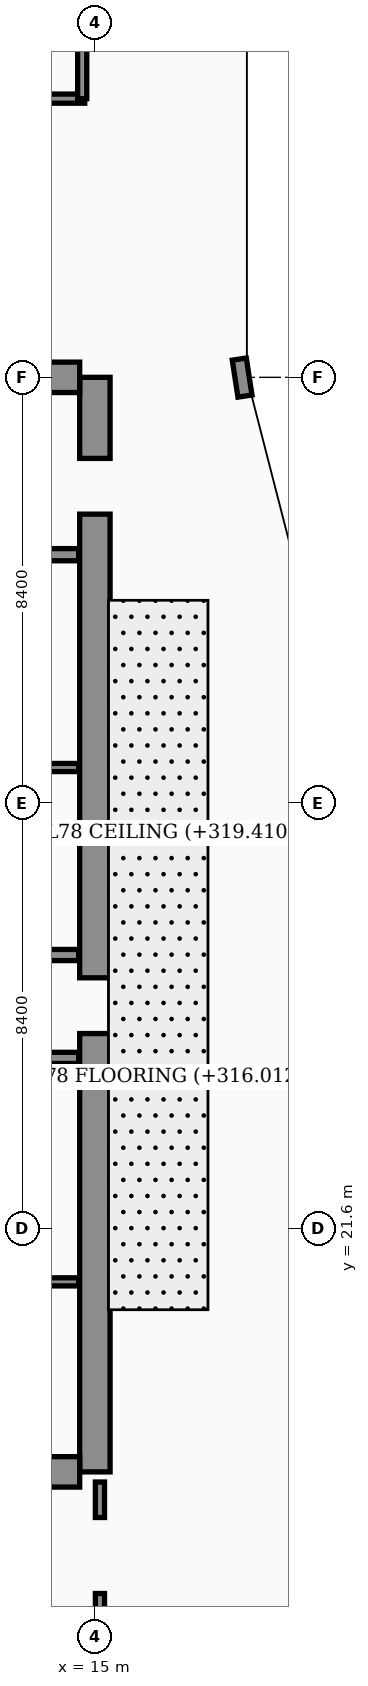
"""IFC4 building model, lengths in metres.
Left out: names, types, materials, properties, quantities, classifications, styles, units other than length and angle.
Written with IfcOpenShell. Run it as: python <this file> out.ifc"""

import sys

from ifc_helpers import new_model, si_unit, direction, frame, frame_2d, origin, place, context, subcontext, project, spatial, rectangle, extrude, element, fill, save


model = new_model("IFC4")
c1 = context("Model", 3, precision=1e-05, world=origin(), true_north=direction((0.0, 1.0)))
c2 = subcontext(c1, "Body", "Model", "MODEL_VIEW")
j1 = project(units=[si_unit("LENGTHUNIT", "METRE"), si_unit("PLANEANGLEUNIT", "RADIAN")], contexts=[c1])
p1 = place(None, origin())
s1 = spatial("IfcSite", under=j1, at=p1, CompositionType="ELEMENT")
p2 = place(p1, origin())
s2 = spatial("IfcBuilding", under=s1, at=p2, CompositionType="ELEMENT")
p3 = place(p2, frame((0.0, 0.0, 316.0)))
s3 = spatial("IfcBuildingStorey", under=s2, at=p3, CompositionType="ELEMENT", Elevation=316.0)
p4 = place(p3, frame((15.0, 16.8, 0.0), z_axis=(0.0, 0.0, 1.0), x_axis=(0.0, 1.0, 0.0)))
e1 = element("IfcWall", 1, at=p4, inside=s3, PredefinedType="SHEAR", context=c2, shape_type="SweptSolid", body=[
    extrude(rectangle(XDim=21.6, YDim=0.6, at=frame_2d((10.8, 0.0))), origin(), (0.0, 0.0, 1.0), 4.26),
])
p5 = place(p4, frame((8.65, 0.0, 0.0)))
e2 = element("IfcOpeningElement", 2, at=p5, cuts=e1, PredefinedType="OPENING", context=c2, shape_type="SweptSolid", body=[
    extrude(rectangle(XDim=1.1, YDim=2.2, at=frame_2d((0.55, 1.1))), frame((0.0, 0.31, 0.0), z_axis=(0.0, -1.0, 0.0), x_axis=(1.0, 0.0, 0.0)), (0.0, 0.0, 1.0), 0.62),
])
p6 = place(p4, frame((18.9, 0.0, 0.0)))
e3 = element("IfcOpeningElement", 3, at=p6, cuts=e1, PredefinedType="OPENING", context=c2, shape_type="SweptSolid", body=[
    extrude(rectangle(XDim=1.1, YDim=2.2, at=frame_2d((0.55, 1.1))), frame((0.0, 0.31, 0.0), z_axis=(0.0, -1.0, 0.0), x_axis=(1.0, 0.0, 0.0)), (0.0, 0.0, 1.0), 0.62),
])
p7 = place(p3, frame((4.5, 38.4, 0.0), z_axis=(0.0, 0.0, 1.0), x_axis=(1.0, 0.0, 0.0)))
e4 = element("IfcWall", 4, at=p7, inside=s3, PredefinedType="SHEAR", context=c2, shape_type="SweptSolid", body=[
    extrude(rectangle(XDim=10.2, YDim=0.6, at=frame_2d((5.1, 0.0))), origin(), (0.0, 0.0, 1.0), 4.26),
])
p8 = place(p7, frame((5.8, 0.0, 0.0)))
e5 = element("IfcOpeningElement", 5, at=p8, cuts=e4, PredefinedType="OPENING", context=c2, shape_type="SweptSolid", body=[
    extrude(rectangle(XDim=1.1, YDim=2.2, at=frame_2d((0.55, 1.1))), frame((0.0, 0.31, 0.0), z_axis=(0.0, -1.0, 0.0), x_axis=(1.0, 0.0, 0.0)), (0.0, 0.0, 1.0), 0.62),
])
p9 = place(p3, frame((4.5, 16.8, 0.0), z_axis=(0.0, 0.0, 1.0), x_axis=(1.0, 0.0, 0.0)))
e6 = element("IfcWall", 6, at=p9, inside=s3, PredefinedType="SHEAR", context=c2, shape_type="SweptSolid", body=[
    extrude(rectangle(XDim=10.2, YDim=0.6, at=frame_2d((5.1, 0.0))), origin(), (0.0, 0.0, 1.0), 4.26),
])
p10 = place(p3, frame((17.962, 38.03, 0.0), z_axis=(0.0, 0.0, 1.0), x_axis=(-0.15141125477, 0.988470855377, 0.0)))
e7 = element("IfcWall", 7, at=p10, inside=s3, PredefinedType="SOLIDWALL", context=c2, shape_type="SweptSolid", body=[
    extrude(rectangle(XDim=0.739, YDim=0.28, at=frame_2d((0.369, 0.0))), origin(), (0.0, 0.0, 1.0), 4.26),
])
p11 = place(p3, frame((9.68, 20.55, 0.0), z_axis=(0.0, 0.0, 1.0), x_axis=(1.0, 0.0, 0.0)))
e8 = element("IfcWall", 8, at=p11, inside=s3, PredefinedType="PARTITIONING", context=c2, shape_type="SweptSolid", body=[
    extrude(rectangle(XDim=5.0, YDim=0.16, at=frame_2d((2.5, 0.0))), origin(), (0.0, 0.0, 1.0), 4.26),
])
p12 = place(p11, frame((1.1, 0.0, 0.0)))
e9 = element("IfcOpeningElement", 9, at=p12, cuts=e8, PredefinedType="OPENING", context=c2, shape_type="SweptSolid", body=[
    extrude(rectangle(XDim=0.98, YDim=2.15, at=frame_2d((0.49, 1.075))), frame((0.0, 0.09, 0.0), z_axis=(0.0, -1.0, 0.0), x_axis=(1.0, 0.0, 0.0)), (0.0, 0.0, 1.0), 0.18),
])
p13 = place(p3, frame((9.68, 24.97, 0.0), z_axis=(0.0, 0.0, 1.0), x_axis=(1.0, 0.0, 0.0)))
e10 = element("IfcWall", 10, at=p13, inside=s3, PredefinedType="SOLIDWALL", context=c2, shape_type="SweptSolid", body=[
    extrude(rectangle(XDim=5.0, YDim=0.22, at=frame_2d((2.5, 0.0))), origin(), (0.0, 0.0, 1.0), 3.69),
])
p14 = place(p13, frame((0.9, 0.0, 0.0)))
e11 = element("IfcOpeningElement", 11, at=p14, cuts=e10, PredefinedType="OPENING", context=c2, shape_type="SweptSolid", body=[
    extrude(rectangle(XDim=0.98, YDim=2.15, at=frame_2d((0.49, 1.075))), frame((0.0, 0.12, 0.0), z_axis=(0.0, -1.0, 0.0), x_axis=(1.0, 0.0, 0.0)), (0.0, 0.0, 1.0), 0.24),
])
p15 = place(p3, frame((12.25, 27.0, 0.0), z_axis=(0.0, 0.0, 1.0), x_axis=(1.0, 0.0, 0.0)))
e12 = element("IfcWall", 12, at=p15, inside=s3, PredefinedType="SOLIDWALL", context=c2, shape_type="SweptSolid", body=[
    extrude(rectangle(XDim=2.43, YDim=0.22, at=frame_2d((1.215, 0.0))), origin(), (0.0, 0.0, 1.0), 4.26),
])
p16 = place(p3, frame((12.25, 30.7, 0.0), z_axis=(0.0, 0.0, 1.0), x_axis=(1.0, 0.0, 0.0)))
e13 = element("IfcWall", 13, at=p16, inside=s3, PredefinedType="PARTITIONING", context=c2, shape_type="SweptSolid", body=[
    extrude(rectangle(XDim=2.43, YDim=0.16, at=frame_2d((1.215, 0.0))), origin(), (0.0, 0.0, 1.0), 4.26),
])
p17 = place(p16, frame((0.55, 0.0, 0.0)))
e14 = element("IfcOpeningElement", 14, at=p17, cuts=e13, PredefinedType="OPENING", context=c2, shape_type="SweptSolid", body=[
    extrude(rectangle(XDim=0.98, YDim=2.15, at=frame_2d((0.49, 1.075))), frame((0.0, 0.09, 0.0), z_axis=(0.0, -1.0, 0.0), x_axis=(1.0, 0.0, 0.0)), (0.0, 0.0, 1.0), 0.18),
])
p18 = place(p3, frame((9.66, 34.9, 0.0), z_axis=(0.0, 0.0, 1.0), x_axis=(1.0, 0.0, 0.0)))
e15 = element("IfcWall", 15, at=p18, inside=s3, PredefinedType="SOLIDWALL", context=c2, shape_type="SweptSolid", body=[
    extrude(rectangle(XDim=5.02, YDim=0.24, at=frame_2d((2.51, 0.0))), origin(), (0.0, 0.0, 1.0), 4.26),
])
p19 = place(p3, frame((4.06, 43.9, 0.0), z_axis=(0.0, 0.0, 1.0), x_axis=(1.0, 0.0, 0.0)))
e16 = element("IfcWall", 16, at=p19, inside=s3, PredefinedType="PARTITIONING", context=c2, shape_type="SweptSolid", body=[
    extrude(rectangle(XDim=10.74, YDim=0.18, at=frame_2d((5.37, 0.0))), origin(), (0.0, 0.0, 1.0), 3.69),
])
p20 = place(p19, frame((0.55, 0.0, 0.0)))
e17 = element("IfcOpeningElement", 17, at=p20, cuts=e16, PredefinedType="OPENING", context=c2, shape_type="SweptSolid", body=[
    extrude(rectangle(XDim=1.02, YDim=2.2, at=frame_2d((0.51, 1.1))), frame((0.0, 0.1, 0.0), z_axis=(0.0, -1.0, 0.0), x_axis=(1.0, 0.0, 0.0)), (0.0, 0.0, 1.0), 0.2),
])
p21 = place(p19, frame((4.65, 0.0, 0.0)))
e18 = element("IfcOpeningElement", 18, at=p21, cuts=e16, PredefinedType="OPENING", context=c2, shape_type="SweptSolid", body=[
    extrude(rectangle(XDim=1.02, YDim=2.2, at=frame_2d((0.51, 1.1))), frame((0.0, 0.1, 0.0), z_axis=(0.0, -1.0, 0.0), x_axis=(1.0, 0.0, 0.0)), (0.0, 0.0, 1.0), 0.2),
])
p22 = place(p19, frame((8.4, 0.0, 0.0)))
e19 = element("IfcOpeningElement", 19, at=p22, cuts=e16, PredefinedType="OPENING", context=c2, shape_type="SweptSolid", body=[
    extrude(rectangle(XDim=1.02, YDim=2.2, at=frame_2d((0.51, 1.1))), frame((0.0, 0.1, 0.0), z_axis=(0.0, -1.0, 0.0), x_axis=(1.0, 0.0, 0.0)), (0.0, 0.0, 1.0), 0.2),
])
p23 = place(p3, frame((14.75, 43.9, 0.0), z_axis=(0.0, 0.0, 1.0), x_axis=(0.0, 1.0, 0.0)))
e20 = element("IfcWall", 20, at=p23, inside=s3, PredefinedType="PARTITIONING", context=c2, shape_type="SweptSolid", body=[
    extrude(rectangle(XDim=3.82, YDim=0.18, at=frame_2d((1.91, 0.0))), origin(), (0.0, 0.0, 1.0), 3.79),
])
p24 = place(p3, frame((15.1, 2.6, 0.0), z_axis=(0.0, 0.0, 1.0), x_axis=(0.0, 1.0, 0.0)))
e21 = element("IfcWall", 21, at=p24, inside=s3, PredefinedType="PARTITIONING", context=c2, shape_type="SweptSolid", body=[
    extrude(rectangle(XDim=14.0, YDim=0.18, at=frame_2d((7.0, 0.0))), origin(), (0.0, 0.0, 1.0), 2.54),
])
p25 = place(p24, frame((11.8, 0.0, 0.0)))
e22 = element("IfcOpeningElement", 22, at=p25, cuts=e21, PredefinedType="OPENING", context=c2, shape_type="SweptSolid", body=[
    extrude(rectangle(XDim=1.5, YDim=2.22, at=frame_2d((0.75, 1.11))), frame((0.0, 0.1, 0.0), z_axis=(0.0, -1.0, 0.0), x_axis=(1.0, 0.0, 0.0)), (0.0, 0.0, 1.0), 0.2),
])
p26 = place(p25, origin())
e23 = element("IfcDoor", 23, at=p26, inside=s3, OperationType="SINGLE_SWING_LEFT", PredefinedType="DOOR", context=c2, shape_type="SweptSolid", body=[
    extrude(rectangle(XDim=1.5, YDim=2.22, at=frame_2d((0.75, 1.11))), frame((0.0, 0.025, 0.0), z_axis=(0.0, -1.0, 0.0), x_axis=(1.0, 0.0, 0.0)), (0.0, 0.0, 1.0), 0.05),
])
fill(e22, e23)
p27 = place(p5, origin())
e24 = element("IfcDoor", 24, at=p27, inside=s3, OperationType="SINGLE_SWING_LEFT", PredefinedType="DOOR", context=c2, shape_type="SweptSolid", body=[
    extrude(rectangle(XDim=1.1, YDim=2.2, at=frame_2d((0.55, 1.1))), frame((0.0, 0.025, 0.0), z_axis=(0.0, -1.0, 0.0), x_axis=(1.0, 0.0, 0.0)), (0.0, 0.0, 1.0), 0.05),
])
fill(e2, e24)
p28 = place(p6, origin())
e25 = element("IfcDoor", 25, at=p28, inside=s3, OperationType="DOUBLE_DOOR_SLIDING", PredefinedType="DOOR", context=c2, shape_type="SweptSolid", body=[
    extrude(rectangle(XDim=1.1, YDim=2.2, at=frame_2d((0.55, 1.1))), frame((0.0, 0.025, 0.0), z_axis=(0.0, -1.0, 0.0), x_axis=(1.0, 0.0, 0.0)), (0.0, 0.0, 1.0), 0.05),
])
fill(e3, e25)
save(model, sys.argv[1])
